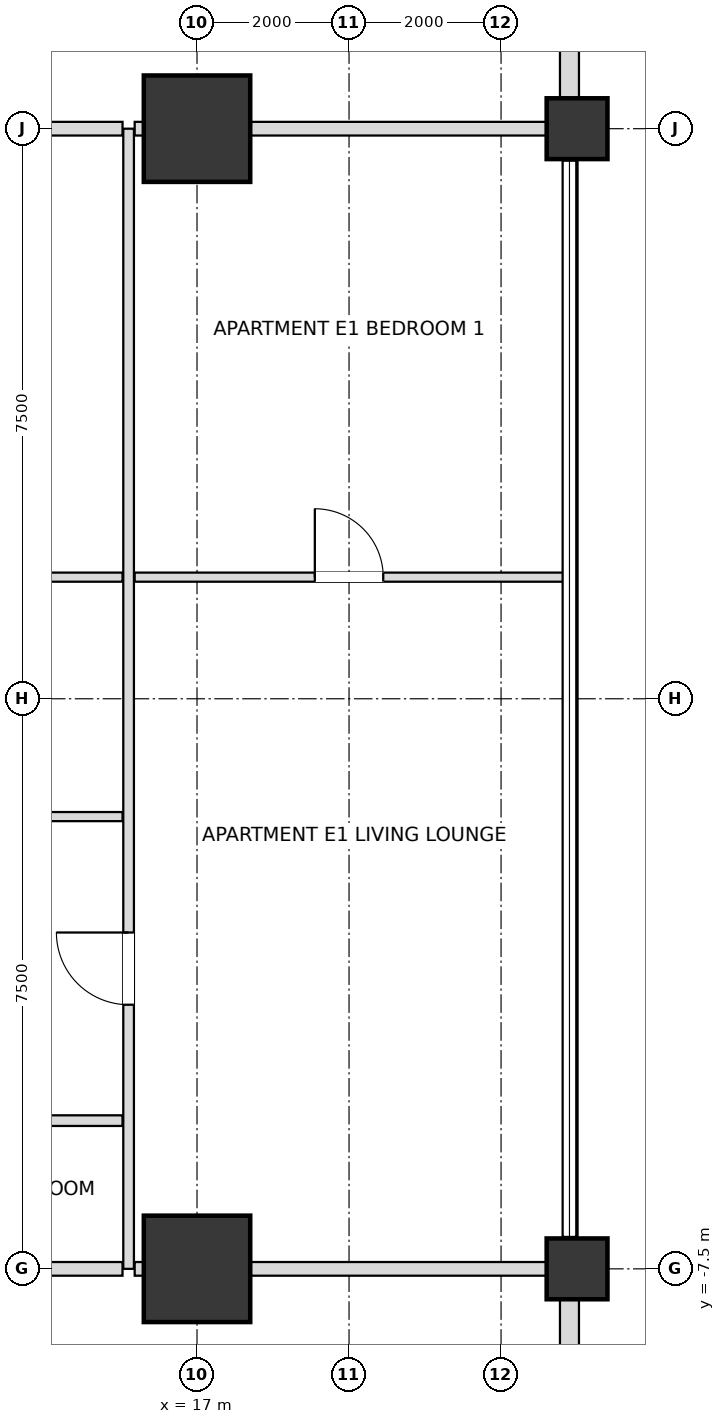
"""IFC4 building model, lengths in metres.
Left out: names, types, materials, properties, quantities, classifications, styles, units other than length and angle.
Written with IfcOpenShell. Run it as: python <this file> out.ifc"""

import sys

from ifc_helpers import new_model, si_unit, direction, frame, frame_2d, origin, origin_2d, place, context, subcontext, project, spatial, rectangle, extrude, element, fill, save


model = new_model("IFC4")
c1 = context("Model", 3, precision=1e-05, world=origin(), true_north=direction((0.0, 1.0)))
c2 = subcontext(c1, "Body", "Model", "MODEL_VIEW")
j1 = project(units=[si_unit("LENGTHUNIT", "METRE"), si_unit("PLANEANGLEUNIT", "RADIAN")], contexts=[c1])
p1 = place(None, origin())
s1 = spatial("IfcSite", under=j1, at=p1, CompositionType="ELEMENT")
p2 = place(p1, origin())
s2 = spatial("IfcBuilding", under=s1, at=p2, CompositionType="ELEMENT")
p3 = place(p2, frame((0.0, 0.0, 43.2)))
s3 = spatial("IfcBuildingStorey", under=s2, at=p3, CompositionType="ELEMENT", Elevation=43.2)
for number, where, z_axis, x_axis in (
    (1, (17.0, -7.5, 0.0), (0.0, 0.0, 1.0), (1.0, 0.0, 0.0)),
    (2, (17.0, 7.5, 0.0), (0.0, 0.0, 1.0), (1.0, 0.0, 0.0)),
):
    element("IfcColumn", number, at=place(p3, frame(where, z_axis=z_axis, x_axis=x_axis)), inside=s3, PredefinedType="USERDEFINED", context=c2, shape_type="SweptSolid", body=[
        extrude(rectangle(XDim=1.4, YDim=1.4, at=origin_2d()), origin(), (0.0, 0.0, 1.0), 3.6),
    ])
for number, where, z_axis, x_axis in (
    (3, (22.0, -7.5, 0.0), (0.0, 0.0, 1.0), (1.0, 0.0, 0.0)),
    (4, (22.0, 7.5, 0.0), (0.0, 0.0, 1.0), (1.0, 0.0, 0.0)),
):
    element("IfcColumn", number, at=place(p3, frame(where, z_axis=z_axis, x_axis=x_axis)), inside=s3, PredefinedType="COLUMN", context=c2, shape_type="SweptSolid", body=[
        extrude(rectangle(XDim=0.8, YDim=0.8, at=origin_2d()), origin(), (0.0, 0.0, 1.0), 3.6),
    ])
p4 = place(p3, frame((21.9, -12.605, 0.0), z_axis=(0.0, 0.0, 1.0), x_axis=(0.0, 1.0, 0.0)))
e5 = element("IfcWall", 5, at=p4, inside=s3, PredefinedType="SOLIDWALL", context=c2, shape_type="SweptSolid", body=[
    extrude(rectangle(XDim=4.71, YDim=0.25, at=frame_2d((2.355, 0.0))), origin(), (0.0, 0.0, 1.0), 2.736),
])
p5 = place(p4, frame((1.455, 0.0, 0.72)))
e6 = element("IfcOpeningElement", 6, at=p5, cuts=e5, PredefinedType="OPENING", context=c2, shape_type="SweptSolid", body=[
    extrude(rectangle(XDim=1.8, YDim=1.68, at=frame_2d((0.9, 0.84))), frame((0.0, 0.135, 0.0), z_axis=(0.0, -1.0, 0.0), x_axis=(1.0, 0.0, 0.0)), (0.0, 0.0, 1.0), 0.27),
])
p6 = place(p3, frame((21.9, 7.895, 0.0), z_axis=(0.0, 0.0, 1.0), x_axis=(0.0, 1.0, 0.0)))
e7 = element("IfcWall", 7, at=p6, inside=s3, PredefinedType="SOLIDWALL", context=c2, shape_type="SweptSolid", body=[
    extrude(rectangle(XDim=4.71, YDim=0.25, at=frame_2d((2.355, 0.0))), origin(), (0.0, 0.0, 1.0), 2.736),
])
p7 = place(p6, frame((1.455, 0.0, 0.72)))
e8 = element("IfcOpeningElement", 8, at=p7, cuts=e7, PredefinedType="OPENING", context=c2, shape_type="SweptSolid", body=[
    extrude(rectangle(XDim=1.8, YDim=1.68, at=frame_2d((0.9, 0.84))), frame((0.0, 0.135, 0.0), z_axis=(0.0, -1.0, 0.0), x_axis=(1.0, 0.0, 0.0)), (0.0, 0.0, 1.0), 0.27),
])
p8 = place(p3, frame((16.1, -7.5, 0.0), z_axis=(0.0, 0.0, 1.0), x_axis=(0.0, 1.0, 0.0)))
e9 = element("IfcWall", 9, at=p8, inside=s3, PredefinedType="PARTITIONING", context=c2, shape_type="SweptSolid", body=[
    extrude(rectangle(XDim=15.0, YDim=0.14, at=frame_2d((7.5, 0.0))), origin(), (0.0, 0.0, 1.0), 3.38),
])
p9 = place(p8, frame((3.475, 0.0, 0.0)))
e10 = element("IfcOpeningElement", 10, at=p9, cuts=e9, PredefinedType="OPENING", context=c2, shape_type="SweptSolid", body=[
    extrude(rectangle(XDim=0.95, YDim=2.1, at=frame_2d((0.475, 1.05))), frame((0.0, 0.08, 0.0), z_axis=(0.0, -1.0, 0.0), x_axis=(1.0, 0.0, 0.0)), (0.0, 0.0, 1.0), 0.16),
])
p10 = place(p3, frame((8.38, -7.5, 0.0), z_axis=(0.0, 0.0, 1.0), x_axis=(1.0, 0.0, 0.0)))
e11 = element("IfcWall", 11, at=p10, inside=s3, PredefinedType="PARTITIONING", context=c2, shape_type="SweptSolid", body=[
    extrude(rectangle(XDim=7.64, YDim=0.18, at=frame_2d((3.82, 0.0))), origin(), (0.0, 0.0, 1.0), 2.816),
])
p11 = place(p3, frame((16.18, -7.5, 0.0), z_axis=(0.0, 0.0, 1.0), x_axis=(1.0, 0.0, 0.0)))
e12 = element("IfcWall", 12, at=p11, inside=s3, PredefinedType="PARTITIONING", context=c2, shape_type="SweptSolid", body=[
    extrude(rectangle(XDim=5.72, YDim=0.18, at=frame_2d((2.86, 0.0))), origin(), (0.0, 0.0, 1.0), 2.816),
])
p12 = place(p3, frame((8.38, -5.55, 0.0), z_axis=(0.0, 0.0, 1.0), x_axis=(1.0, 0.0, 0.0)))
e13 = element("IfcWall", 13, at=p12, inside=s3, PredefinedType="PARTITIONING", context=c2, shape_type="SweptSolid", body=[
    extrude(rectangle(XDim=7.64, YDim=0.14, at=frame_2d((3.82, 0.0))), origin(), (0.0, 0.0, 1.0), 2.948),
])
p13 = place(p12, frame((3.37, 0.0, 0.0)))
e14 = element("IfcOpeningElement", 14, at=p13, cuts=e13, PredefinedType="OPENING", context=c2, shape_type="SweptSolid", body=[
    extrude(rectangle(XDim=0.9, YDim=2.1, at=frame_2d((0.45, 1.05))), frame((0.0, 0.08, 0.0), z_axis=(0.0, -1.0, 0.0), x_axis=(1.0, 0.0, 0.0)), (0.0, 0.0, 1.0), 0.16),
])
p14 = place(p3, frame((8.38, -1.55, 0.0), z_axis=(0.0, 0.0, 1.0), x_axis=(1.0, 0.0, 0.0)))
e15 = element("IfcWall", 15, at=p14, inside=s3, PredefinedType="PARTITIONING", context=c2, shape_type="SweptSolid", body=[
    extrude(rectangle(XDim=7.64, YDim=0.12, at=frame_2d((3.82, 0.0))), origin(), (0.0, 0.0, 1.0), 2.948),
])
p15 = place(p14, frame((3.345, 0.0, 0.0)))
e16 = element("IfcOpeningElement", 16, at=p15, cuts=e15, PredefinedType="OPENING", context=c2, shape_type="SweptSolid", body=[
    extrude(rectangle(XDim=0.95, YDim=2.1, at=frame_2d((0.475, 1.05))), frame((0.0, 0.07, 0.0), z_axis=(0.0, -1.0, 0.0), x_axis=(1.0, 0.0, 0.0)), (0.0, 0.0, 1.0), 0.14),
])
p16 = place(p3, frame((8.38, 1.6, 0.0), z_axis=(0.0, 0.0, 1.0), x_axis=(1.0, 0.0, 0.0)))
e17 = element("IfcWall", 17, at=p16, inside=s3, PredefinedType="PARTITIONING", context=c2, shape_type="SweptSolid", body=[
    extrude(rectangle(XDim=7.64, YDim=0.12, at=frame_2d((3.82, 0.0))), origin(), (0.0, 0.0, 1.0), 2.948),
])
p17 = place(p16, frame((3.37, 0.0, 0.0)))
e18 = element("IfcOpeningElement", 18, at=p17, cuts=e17, PredefinedType="OPENING", context=c2, shape_type="SweptSolid", body=[
    extrude(rectangle(XDim=0.9, YDim=2.1, at=frame_2d((0.45, 1.05))), frame((0.0, 0.07, 0.0), z_axis=(0.0, -1.0, 0.0), x_axis=(1.0, 0.0, 0.0)), (0.0, 0.0, 1.0), 0.14),
])
p18 = place(p3, frame((16.18, 1.6, 0.0), z_axis=(0.0, 0.0, 1.0), x_axis=(1.0, 0.0, 0.0)))
e19 = element("IfcWall", 19, at=p18, inside=s3, PredefinedType="PARTITIONING", context=c2, shape_type="SweptSolid", body=[
    extrude(rectangle(XDim=5.64, YDim=0.12, at=frame_2d((2.82, 0.0))), origin(), (0.0, 0.0, 1.0), 2.816),
])
p19 = place(p18, frame((2.37, 0.0, 0.0)))
e20 = element("IfcOpeningElement", 20, at=p19, cuts=e19, PredefinedType="OPENING", context=c2, shape_type="SweptSolid", body=[
    extrude(rectangle(XDim=0.9, YDim=2.1, at=frame_2d((0.45, 1.05))), frame((0.0, 0.07, 0.0), z_axis=(0.0, -1.0, 0.0), x_axis=(1.0, 0.0, 0.0)), (0.0, 0.0, 1.0), 0.14),
])
p20 = place(p3, frame((8.38, 7.5, 0.0), z_axis=(0.0, 0.0, 1.0), x_axis=(1.0, 0.0, 0.0)))
e21 = element("IfcWall", 21, at=p20, inside=s3, PredefinedType="PARTITIONING", context=c2, shape_type="SweptSolid", body=[
    extrude(rectangle(XDim=7.64, YDim=0.18, at=frame_2d((3.82, 0.0))), origin(), (0.0, 0.0, 1.0), 2.816),
])
p21 = place(p3, frame((16.18, 7.5, 0.0), z_axis=(0.0, 0.0, 1.0), x_axis=(1.0, 0.0, 0.0)))
e22 = element("IfcWall", 22, at=p21, inside=s3, PredefinedType="PARTITIONING", context=c2, shape_type="SweptSolid", body=[
    extrude(rectangle(XDim=5.72, YDim=0.18, at=frame_2d((2.86, 0.0))), origin(), (0.0, 0.0, 1.0), 2.816),
])
p22 = place(p9, origin())
e23 = element("IfcDoor", 23, at=p22, inside=s3, OperationType="SINGLE_SWING_RIGHT", PredefinedType="DOOR", context=c2, shape_type="SweptSolid", body=[
    extrude(rectangle(XDim=0.95, YDim=2.1, at=frame_2d((0.475, 1.05))), frame((0.0, 0.025, 0.0), z_axis=(0.0, -1.0, 0.0), x_axis=(1.0, 0.0, 0.0)), (0.0, 0.0, 1.0), 0.05),
])
fill(e10, e23)
p23 = place(p19, origin())
e24 = element("IfcDoor", 24, at=p23, inside=s3, OperationType="SINGLE_SWING_LEFT", PredefinedType="DOOR", context=c2, shape_type="SweptSolid", body=[
    extrude(rectangle(XDim=0.9, YDim=2.1, at=frame_2d((0.45, 1.05))), frame((0.0, 0.025, 0.0), z_axis=(0.0, -1.0, 0.0), x_axis=(1.0, 0.0, 0.0)), (0.0, 0.0, 1.0), 0.05),
])
fill(e20, e24)
save(model, sys.argv[1])
